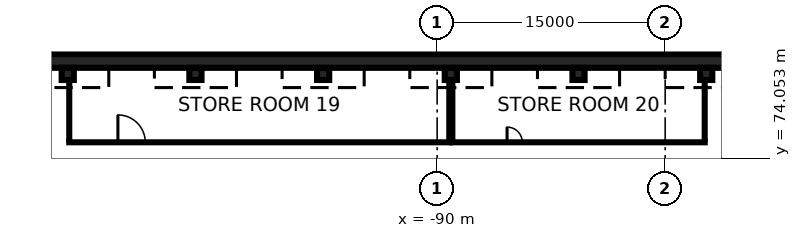
"""IFC4 building model, lengths in metres.
Left out: names, types, materials, properties, quantities, classifications, styles, units other than length and angle.
Written with IfcOpenShell. Run it as: python <this file> out.ifc"""

import sys

from ifc_helpers import new_model, si_unit, direction, frame, frame_2d, origin, origin_2d, place, context, subcontext, project, spatial, rectangle, extrude, element, fill, save


model = new_model("IFC4")
c1 = context("Model", 3, precision=1e-05, world=origin(), true_north=direction((0.0, 1.0)))
c2 = subcontext(c1, "Body", "Model", "MODEL_VIEW")
j1 = project(units=[si_unit("LENGTHUNIT", "METRE"), si_unit("PLANEANGLEUNIT", "RADIAN")], contexts=[c1])
p1 = place(None, origin())
s1 = spatial("IfcSite", under=j1, at=p1, CompositionType="ELEMENT")
p2 = place(p1, origin())
s2 = spatial("IfcBuilding", under=s1, at=p2, CompositionType="ELEMENT")
p3 = place(p2, frame((0.0, 0.0, -12.0)))
s3 = spatial("IfcBuildingStorey", under=s2, at=p3, CompositionType="ELEMENT", Elevation=-12.0)
p4 = place(p3, frame((-123.6, 80.45, 0.0), z_axis=(0.0, 0.0, 1.0), x_axis=(1.0, 0.0, 0.0)))
e1 = element("IfcWall", 1, at=p4, inside=s3, PredefinedType="USERDEFINED", context=c2, shape_type="SweptSolid", body=[
    extrude(rectangle(XDim=169.8, YDim=0.9, at=frame_2d((84.9, 0.0))), origin(), (0.0, 0.0, 1.0), 11.55),
])
for number, where, z_axis, x_axis in (
    (2, (-114.3, 79.6, 0.0), (0.0, 0.0, 1.0), (1.0, 0.0, 0.0)),
    (3, (-105.9, 79.6, 0.0), (0.0, 0.0, 1.0), (1.0, 0.0, 0.0)),
    (4, (-97.5, 79.6, 0.0), (0.0, 0.0, 1.0), (1.0, 0.0, 0.0)),
    (5, (-89.1, 79.6, 0.0), (0.0, 0.0, 1.0), (1.0, 0.0, 0.0)),
    (6, (-80.7, 79.6, 0.0), (0.0, 0.0, 1.0), (1.0, 0.0, 0.0)),
    (7, (-72.3, 79.6, 0.0), (0.0, 0.0, 1.0), (1.0, 0.0, 0.0)),
):
    element("IfcColumn", number, at=place(p3, frame(where, z_axis=z_axis, x_axis=x_axis)), inside=s3, PredefinedType="COLUMN", context=c2, shape_type="SweptSolid", body=[
        extrude(rectangle(XDim=0.8, YDim=0.8, at=origin_2d()), origin(), (0.0, 0.0, 1.0), 4.4),
    ])
p5 = place(p3, frame((-114.3, 75.1, 0.0), z_axis=(0.0, 0.0, 1.0), x_axis=(1.0, 0.0, 0.0)))
e8 = element("IfcWall", 8, at=p5, inside=s3, PredefinedType="PARTITIONING", context=c2, shape_type="SweptSolid", body=[
    extrude(rectangle(XDim=25.2, YDim=0.2, at=frame_2d((12.6, 0.0))), origin(), (0.0, 0.0, 1.0), 4.4),
])
p6 = place(p5, frame((3.3, 0.0, 0.0)))
e9 = element("IfcOpeningElement", 9, at=p6, cuts=e8, PredefinedType="OPENING", context=c2, shape_type="SweptSolid", body=[
    extrude(rectangle(XDim=1.8, YDim=2.1, at=frame_2d((0.9, 1.05))), frame((0.0, 0.11, 0.0), z_axis=(0.0, -1.0, 0.0), x_axis=(1.0, 0.0, 0.0)), (0.0, 0.0, 1.0), 0.22),
])
for number, where, z_axis, x_axis in (
    (10, (-114.2, 75.2, 0.0), (0.0, 0.0, 1.0), (0.0, 1.0, 0.0)),
    (11, (-89.2, 75.2, 0.0), (0.0, 0.0, 1.0), (0.0, 1.0, 0.0)),
):
    element("IfcWall", number, at=place(p3, frame(where, z_axis=z_axis, x_axis=x_axis)), inside=s3, PredefinedType="PARTITIONING", context=c2, shape_type="SweptSolid", body=[
        extrude(rectangle(XDim=4.0, YDim=0.2, at=frame_2d((2.0, 0.0))), origin(), (0.0, 0.0, 1.0), 4.4),
    ])
p7 = place(p3, frame((-89.1, 75.1, 0.0), z_axis=(0.0, 0.0, 1.0), x_axis=(1.0, 0.0, 0.0)))
e12 = element("IfcWall", 12, at=p7, inside=s3, PredefinedType="PARTITIONING", context=c2, shape_type="SweptSolid", body=[
    extrude(rectangle(XDim=16.8, YDim=0.2, at=frame_2d((8.4, 0.0))), origin(), (0.0, 0.0, 1.0), 4.4),
])
p8 = place(p7, frame((3.7, 0.0, 0.0)))
e13 = element("IfcOpeningElement", 13, at=p8, cuts=e12, PredefinedType="OPENING", context=c2, shape_type="SweptSolid", body=[
    extrude(rectangle(XDim=1.0, YDim=2.1, at=frame_2d((0.5, 1.05))), frame((0.0, 0.11, 0.0), z_axis=(0.0, -1.0, 0.0), x_axis=(1.0, 0.0, 0.0)), (0.0, 0.0, 1.0), 0.22),
])
for number, where, z_axis, x_axis in (
    (14, (-89.0, 75.2, 0.0), (0.0, 0.0, 1.0), (0.0, 1.0, 0.0)),
    (15, (-72.4, 75.2, 0.0), (0.0, 0.0, 1.0), (0.0, 1.0, 0.0)),
):
    element("IfcWall", number, at=place(p3, frame(where, z_axis=z_axis, x_axis=x_axis)), inside=s3, PredefinedType="PARTITIONING", context=c2, shape_type="SweptSolid", body=[
        extrude(rectangle(XDim=4.0, YDim=0.2, at=frame_2d((2.0, 0.0))), origin(), (0.0, 0.0, 1.0), 4.4),
    ])
p9 = place(p6, origin())
e16 = element("IfcDoor", 16, at=p9, inside=s3, OperationType="DOUBLE_DOOR_SINGLE_SWING", PredefinedType="DOOR", context=c2, shape_type="SweptSolid", body=[
    extrude(rectangle(XDim=1.8, YDim=2.1, at=frame_2d((0.9, 1.05))), frame((0.0, 0.025, 0.0), z_axis=(0.0, -1.0, 0.0), x_axis=(1.0, 0.0, 0.0)), (0.0, 0.0, 1.0), 0.05),
])
fill(e9, e16)
p10 = place(p8, origin())
e17 = element("IfcDoor", 17, at=p10, inside=s3, OperationType="SINGLE_SWING_LEFT", PredefinedType="DOOR", context=c2, shape_type="SweptSolid", body=[
    extrude(rectangle(XDim=1.0, YDim=2.1, at=frame_2d((0.5, 1.05))), frame((0.0, 0.025, 0.0), z_axis=(0.0, -1.0, 0.0), x_axis=(1.0, 0.0, 0.0)), (0.0, 0.0, 1.0), 0.05),
])
fill(e13, e17)
save(model, sys.argv[1])
